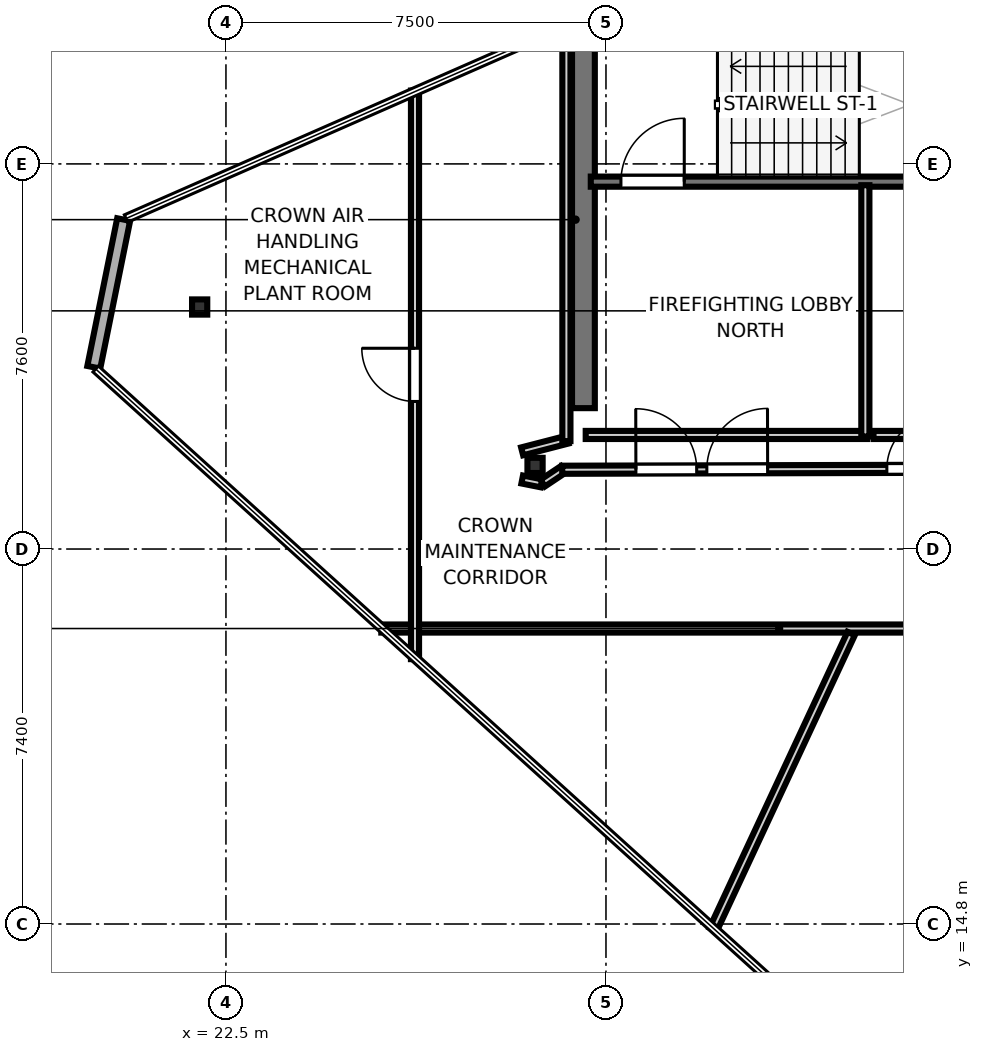
"""IFC4 building model, lengths in metres.
Left out: names, types, materials, properties, quantities, classifications, styles, units other than length and angle.
Written with IfcOpenShell. Run it as: python <this file> out.ifc"""

import sys

from ifc_helpers import new_model, si_unit, direction, frame, frame_2d, origin, origin_2d, place, context, subcontext, project, spatial, rectangle, i_section, extrude, element, fill, save


model = new_model("IFC4")
c1 = context("Model", 3, precision=1e-05, world=origin(), true_north=direction((0.0, 1.0)))
c2 = subcontext(c1, "Body", "Model", "MODEL_VIEW")
j1 = project(units=[si_unit("LENGTHUNIT", "METRE"), si_unit("PLANEANGLEUNIT", "RADIAN")], contexts=[c1])
p1 = place(None, origin())
s1 = spatial("IfcSite", under=j1, at=p1, CompositionType="ELEMENT")
p2 = place(p1, origin())
s2 = spatial("IfcBuilding", under=s1, at=p2, CompositionType="ELEMENT")
p3 = place(p2, frame((0.0, 0.0, 371.3)))
s3 = spatial("IfcBuildingStorey", under=s2, at=p3, CompositionType="ELEMENT", Elevation=371.3)
p4 = place(p3, frame((29.555, 24.98, 0.0), z_axis=(0.0, 0.0, 1.0), x_axis=(0.0, 1.0, 0.0)))
e1 = element("IfcWall", 1, at=p4, inside=s3, PredefinedType="SHEAR", context=c2, shape_type="SweptSolid", body=[
    extrude(rectangle(XDim=7.24, YDim=0.45, at=frame_2d((3.62, 0.0))), origin(), (0.0, 0.0, 1.0), 3.55),
])
for number, where, z_axis, x_axis in (
    (2, (28.6, 23.85, 0.0), (0.0, 0.0, 1.0), (1.0, 0.0, 0.0)),
    (3, (21.981, 26.976, 0.0), (0.0, 0.0, 1.0), (1.0, 0.0, 0.0)),
):
    element("IfcColumn", number, at=place(p3, frame(where, z_axis=z_axis, x_axis=x_axis)), inside=s3, PredefinedType="COLUMN", context=c2, shape_type="SweptSolid", body=[
        extrude(i_section(OverallWidth=0.3, OverallDepth=0.3, WebThickness=0.01, FlangeThickness=0.015, at=origin_2d()), origin(), (0.0, 0.0, 1.0), 3.75),
    ])
p5 = place(p3, frame((20.481, 28.701, 0.0), z_axis=(0.0, 0.0, 1.0), x_axis=(-0.19819987927, -0.980161623334, 0.0)))
e4 = element("IfcWall", 4, at=p5, inside=s3, PredefinedType="SOLIDWALL", context=c2, shape_type="SweptSolid", body=[
    extrude(rectangle(XDim=2.974, YDim=0.26, at=frame_2d((1.487, 0.0))), origin(), (0.0, 0.0, 1.0), 3.55),
])
p6 = place(p3, frame((29.7, 29.45, 0.0), z_axis=(0.0, 0.0, 1.0), x_axis=(1.0, 0.0, 0.0)))
e5 = element("IfcWall", 5, at=p6, inside=s3, PredefinedType="SOLIDWALL", context=c2, shape_type="SweptSolid", body=[
    extrude(rectangle(XDim=8.3, YDim=0.2, at=frame_2d((4.15, 0.0))), origin(), (0.0, 0.0, 1.0), 3.55),
])
p7 = place(p6, frame((0.595, 0.0, 0.0)))
e6 = element("IfcOpeningElement", 6, at=p7, cuts=e5, PredefinedType="OPENING", context=c2, shape_type="SweptSolid", body=[
    extrude(rectangle(XDim=1.25, YDim=2.15, at=frame_2d((0.625, 1.075))), frame((0.0, 0.11, 0.0), z_axis=(0.0, -1.0, 0.0), x_axis=(1.0, 0.0, 0.0)), (0.0, 0.0, 1.0), 0.22),
])
p8 = place(p3, frame((35.15, 24.451, 0.0), z_axis=(0.0, 0.0, 1.0), x_axis=(-1.0, 0.0, 0.0)))
e7 = element("IfcWall", 7, at=p8, inside=s3, PredefinedType="PARTITIONING", context=c2, shape_type="SweptSolid", body=[
    extrude(rectangle(XDim=5.55, YDim=0.16, at=frame_2d((2.775, 0.0))), origin(), (0.0, 0.0, 1.0), 2.87),
])
p9 = place(p3, frame((35.119, 29.38, 0.0), z_axis=(0.0, 0.0, 1.0), x_axis=(0.0, -1.0, 0.0)))
e8 = element("IfcWall", 8, at=p9, inside=s3, PredefinedType="PARTITIONING", context=c2, shape_type="SweptSolid", body=[
    extrude(rectangle(XDim=4.96, YDim=0.16, at=frame_2d((2.48, 0.0))), origin(), (0.0, 0.0, 1.0), 2.08),
])
p10 = place(p3, frame((36.85, 24.451, 0.0), z_axis=(0.0, 0.0, 1.0), x_axis=(-1.0, 0.0, 0.0)))
e9 = element("IfcWall", 9, at=p10, inside=s3, PredefinedType="PARTITIONING", context=c2, shape_type="SweptSolid", body=[
    extrude(rectangle(XDim=1.57, YDim=0.16, at=frame_2d((0.785, 0.0))), origin(), (0.0, 0.0, 1.0), 2.87),
])
p11 = place(p3, frame((29.242, 24.359, 0.0), z_axis=(0.0, 0.0, 1.0), x_axis=(-0.968190928123, -0.250212563035, 0.0)))
e10 = element("IfcWall", 10, at=p11, inside=s3, PredefinedType="PARTITIONING", context=c2, shape_type="SweptSolid", body=[
    extrude(rectangle(XDim=0.927, YDim=0.16, at=frame_2d((0.463, 0.0))), origin(), (0.0, 0.0, 1.0), 2.87),
])
p12 = place(p3, frame((28.346, 23.572, 0.0), z_axis=(0.0, 0.0, 1.0), x_axis=(0.980749356168, -0.19527083852, 0.0)))
e11 = element("IfcWall", 11, at=p12, inside=s3, PredefinedType="PARTITIONING", context=c2, shape_type="SweptSolid", body=[
    extrude(rectangle(XDim=0.389, YDim=0.16, at=frame_2d((0.194, 0.0))), origin(), (0.0, 0.0, 1.0), 2.87),
])
p13 = place(p3, frame((28.751, 23.501, 0.0), z_axis=(0.0, 0.0, 1.0), x_axis=(0.831506528289, 0.555514980368, 0.0)))
e12 = element("IfcWall", 12, at=p13, inside=s3, PredefinedType="PARTITIONING", context=c2, shape_type="SweptSolid", body=[
    extrude(rectangle(XDim=0.484, YDim=0.16, at=frame_2d((0.242, 0.0))), origin(), (0.0, 0.0, 1.0), 2.87),
])
p14 = place(p3, frame((29.136, 23.764, 0.0), z_axis=(0.0, 0.0, 1.0), x_axis=(0.999996877471, 0.002499009437, 0.0)))
e13 = element("IfcWall", 13, at=p14, inside=s3, PredefinedType="PARTITIONING", context=c2, shape_type="SweptSolid", body=[
    extrude(rectangle(XDim=8.695, YDim=0.16, at=frame_2d((4.347, 0.0))), origin(), (0.0, 0.0, 1.0), 2.87),
])
p15 = place(p14, frame((2.854, 0.0, 0.0)))
e14 = element("IfcOpeningElement", 14, at=p15, cuts=e13, PredefinedType="OPENING", context=c2, shape_type="SweptSolid", body=[
    extrude(rectangle(XDim=1.2, YDim=2.15, at=frame_2d((0.6, 1.075))), frame((0.0, 0.09, 0.0), z_axis=(0.0, -1.0, 0.0), x_axis=(1.0, 0.0, 0.0)), (0.0, 0.0, 1.0), 0.18),
])
p16 = place(p14, frame((6.407, 0.0, 0.0)))
e15 = element("IfcOpeningElement", 15, at=p16, cuts=e13, PredefinedType="OPENING", context=c2, shape_type="SweptSolid", body=[
    extrude(rectangle(XDim=1.05, YDim=2.15, at=frame_2d((0.525, 1.075))), frame((0.0, 0.09, 0.0), z_axis=(0.0, -1.0, 0.0), x_axis=(1.0, 0.0, 0.0)), (0.0, 0.0, 1.0), 0.18),
])
p17 = place(p14, frame((1.454, 0.0, 0.0)))
e16 = element("IfcOpeningElement", 16, at=p17, cuts=e13, PredefinedType="OPENING", context=c2, shape_type="SweptSolid", body=[
    extrude(rectangle(XDim=1.2, YDim=2.15, at=frame_2d((0.6, 1.075))), frame((0.0, 0.09, 0.0), z_axis=(0.0, -1.0, 0.0), x_axis=(1.0, 0.0, 0.0)), (0.0, 0.0, 1.0), 0.18),
])
p18 = place(p3, frame((41.268, 20.631, 0.0), z_axis=(0.0, 0.0, 1.0), x_axis=(-1.0, 0.0, 0.0)))
e17 = element("IfcWall", 17, at=p18, inside=s3, PredefinedType="PARTITIONING", context=c2, shape_type="SweptSolid", body=[
    extrude(rectangle(XDim=15.702, YDim=0.16, at=frame_2d((7.851, 0.0))), origin(), (0.0, 0.0, 1.0), 2.87),
])
p19 = place(p3, frame((26.231, 20.027, 0.0), z_axis=(0.0, 0.0, 1.0), x_axis=(0.0, 1.0, 0.0)))
e18 = element("IfcWall", 18, at=p19, inside=s3, PredefinedType="PARTITIONING", context=c2, shape_type="SweptSolid", body=[
    extrude(rectangle(XDim=11.22, YDim=0.16, at=frame_2d((5.61, 0.0))), origin(), (0.0, 0.0, 1.0), 2.87),
])
p20 = place(p19, frame((5.085, 0.0, 0.0)))
e19 = element("IfcOpeningElement", 19, at=p20, cuts=e18, PredefinedType="OPENING", context=c2, shape_type="SweptSolid", body=[
    extrude(rectangle(XDim=1.05, YDim=2.15, at=frame_2d((0.525, 1.075))), frame((0.0, 0.09, 0.0), z_axis=(0.0, -1.0, 0.0), x_axis=(1.0, 0.0, 0.0)), (0.0, 0.0, 1.0), 0.18),
])
p21 = place(p3, frame((29.219, 32.56, 0.0), z_axis=(0.0, 0.0, 1.0), x_axis=(0.0, -1.0, 0.0)))
e20 = element("IfcWall", 20, at=p21, inside=s3, PredefinedType="PARTITIONING", context=c2, shape_type="SweptSolid", body=[
    extrude(rectangle(XDim=8.23, YDim=0.16, at=frame_2d((4.115, 0.0))), origin(), (0.0, 0.0, 1.0), 2.87),
])
p22 = place(p3, frame((34.839, 20.533, 0.0), z_axis=(0.0, 0.0, 1.0), x_axis=(-0.4226199914, -0.906306980481, 0.0)))
e21 = element("IfcWall", 21, at=p22, inside=s3, PredefinedType="PARTITIONING", context=c2, shape_type="SweptSolid", body=[
    extrude(rectangle(XDim=6.445, YDim=0.16, at=frame_2d((3.222, 0.0))), origin(), (0.0, 0.0, 1.0), 2.87),
])
p23 = place(p7, origin())
e22 = element("IfcDoor", 22, at=p23, inside=s3, OperationType="SINGLE_SWING_RIGHT", PredefinedType="DOOR", context=c2, shape_type="SweptSolid", body=[
    extrude(rectangle(XDim=1.25, YDim=2.15, at=frame_2d((0.625, 1.075))), frame((0.0, 0.025, 0.0), z_axis=(0.0, -1.0, 0.0), x_axis=(1.0, 0.0, 0.0)), (0.0, 0.0, 1.0), 0.05),
])
fill(e6, e22)
p24 = place(p15, origin())
e23 = element("IfcDoor", 23, at=p24, inside=s3, OperationType="SINGLE_SWING_RIGHT", PredefinedType="DOOR", context=c2, shape_type="SweptSolid", body=[
    extrude(rectangle(XDim=1.2, YDim=2.15, at=frame_2d((0.6, 1.075))), frame((0.0, 0.025, 0.0), z_axis=(0.0, -1.0, 0.0), x_axis=(1.0, 0.0, 0.0)), (0.0, 0.0, 1.0), 0.05),
])
fill(e14, e23)
p25 = place(p16, origin())
e24 = element("IfcDoor", 24, at=p25, inside=s3, OperationType="SINGLE_SWING_RIGHT", PredefinedType="DOOR", context=c2, shape_type="SweptSolid", body=[
    extrude(rectangle(XDim=1.05, YDim=2.15, at=frame_2d((0.525, 1.075))), frame((0.0, 0.025, 0.0), z_axis=(0.0, -1.0, 0.0), x_axis=(1.0, 0.0, 0.0)), (0.0, 0.0, 1.0), 0.05),
])
fill(e15, e24)
p26 = place(p17, origin())
e25 = element("IfcDoor", 25, at=p26, inside=s3, OperationType="SINGLE_SWING_LEFT", PredefinedType="DOOR", context=c2, shape_type="SweptSolid", body=[
    extrude(rectangle(XDim=1.2, YDim=2.15, at=frame_2d((0.6, 1.075))), frame((0.0, 0.025, 0.0), z_axis=(0.0, -1.0, 0.0), x_axis=(1.0, 0.0, 0.0)), (0.0, 0.0, 1.0), 0.05),
])
fill(e16, e25)
p27 = place(p20, origin())
e26 = element("IfcDoor", 26, at=p27, inside=s3, OperationType="SINGLE_SWING_RIGHT", PredefinedType="DOOR", context=c2, shape_type="SweptSolid", body=[
    extrude(rectangle(XDim=1.05, YDim=2.15, at=frame_2d((0.525, 1.075))), frame((0.0, 0.025, 0.0), z_axis=(0.0, -1.0, 0.0), x_axis=(1.0, 0.0, 0.0)), (0.0, 0.0, 1.0), 0.05),
])
fill(e19, e26)
save(model, sys.argv[1])
